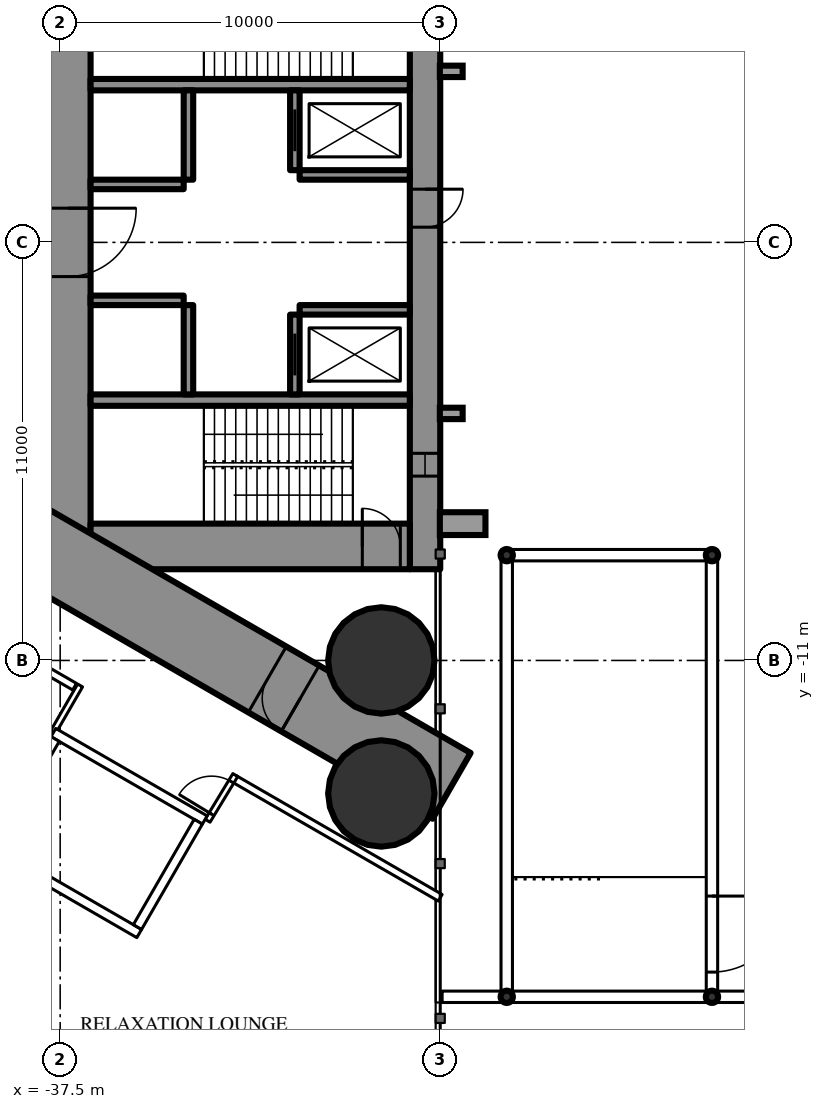
"""IFC4 building model, lengths in metres.
Left out: names, types, materials, properties, quantities, classifications, styles, units other than length and angle.
Written with IfcOpenShell. Run it as: python <this file> out.ifc"""

import sys

from ifc_helpers import new_model, si_unit, direction, frame, frame_2d, origin, origin_2d, place, context, subcontext, project, spatial, rectangle, hollow_circle, extrude, element, fill, save


model = new_model("IFC4")
c1 = context("Model", 3, precision=1e-05, world=origin(), true_north=direction((0.0, 1.0)))
c2 = subcontext(c1, "Body", "Model", "MODEL_VIEW")
j1 = project(units=[si_unit("LENGTHUNIT", "METRE"), si_unit("PLANEANGLEUNIT", "RADIAN")], contexts=[c1])
p1 = place(None, origin())
s1 = spatial("IfcSite", under=j1, at=p1, CompositionType="ELEMENT")
p2 = place(p1, origin())
s2 = spatial("IfcBuilding", under=s1, at=p2, CompositionType="ELEMENT")
p3 = place(p2, frame((0.0, 0.0, 12.6)))
s3 = spatial("IfcBuildingStorey", under=s2, at=p3, CompositionType="ELEMENT", Elevation=12.6)
for number, where, z_axis, x_axis in (
    (1, (-29.05, -11.0, 0.0), (0.0, 0.0, 1.0), (1.0, 0.0, 0.0)),
    (2, (-29.05, -14.5, 0.0), (0.0, 0.0, 1.0), (1.0, 0.0, 0.0)),
):
    element("IfcColumn", number, at=place(p3, frame(where, z_axis=z_axis, x_axis=x_axis)), inside=s3, PredefinedType="COLUMN", context=c2, shape_type="SweptSolid", body=[
        extrude(hollow_circle(Radius=1.4, WallThickness=0.12, at=origin_2d()), origin(), (0.0, 0.0, 1.0), 5.4),
    ])
p4 = place(p3, frame((-27.9, 8.6, 0.0), z_axis=(0.0, 0.0, 1.0), x_axis=(0.0, -1.0, 0.0)))
e3 = element("IfcWall", 3, at=p4, inside=s3, PredefinedType="SHEAR", context=c2, shape_type="SweptSolid", body=[
    extrude(rectangle(XDim=17.2, YDim=0.8, at=frame_2d((8.6, 0.0))), origin(), (0.0, 0.0, 1.0), 5.4),
])
p5 = place(p4, frame((7.2, 0.0, 0.0)))
e4 = element("IfcOpeningElement", 4, at=p5, cuts=e3, PredefinedType="OPENING", context=c2, shape_type="SweptSolid", body=[
    extrude(rectangle(XDim=1.0, YDim=2.2, at=frame_2d((0.5, 1.1))), frame((0.0, 0.41, 0.0), z_axis=(0.0, -1.0, 0.0), x_axis=(1.0, 0.0, 0.0)), (0.0, 0.0, 1.0), 0.82),
])
p6 = place(p4, frame((2.45, 0.0, 0.6)))
e5 = element("IfcOpeningElement", 5, at=p6, cuts=e3, PredefinedType="OPENING", context=c2, shape_type="SweptSolid", body=[
    extrude(rectangle(XDim=0.6, YDim=3.9, at=frame_2d((0.3, 1.95))), frame((0.0, 0.41, 0.0), z_axis=(0.0, -1.0, 0.0), x_axis=(1.0, 0.0, 0.0)), (0.0, 0.0, 1.0), 0.82),
])
p7 = place(p4, frame((14.15, 0.0, 0.6)))
e6 = element("IfcOpeningElement", 6, at=p7, cuts=e3, PredefinedType="OPENING", context=c2, shape_type="SweptSolid", body=[
    extrude(rectangle(XDim=0.6, YDim=3.9, at=frame_2d((0.3, 1.95))), frame((0.0, 0.41, 0.0), z_axis=(0.0, -1.0, 0.0), x_axis=(1.0, 0.0, 0.0)), (0.0, 0.0, 1.0), 0.82),
])
p8 = place(p3, frame((-37.3, 8.6, 0.0), z_axis=(0.0, 0.0, 1.0), x_axis=(0.0, -1.0, 0.0)))
e7 = element("IfcWall", 7, at=p8, inside=s3, PredefinedType="SHEAR", context=c2, shape_type="SweptSolid", body=[
    extrude(rectangle(XDim=17.2, YDim=1.2, at=frame_2d((8.6, 0.0))), origin(), (0.0, 0.0, 1.0), 5.4),
])
p9 = place(p8, frame((7.7, 0.0, 0.0)))
e8 = element("IfcOpeningElement", 8, at=p9, cuts=e7, PredefinedType="OPENING", context=c2, shape_type="SweptSolid", body=[
    extrude(rectangle(XDim=1.8, YDim=2.2, at=frame_2d((0.9, 1.1))), frame((0.0, 0.61, 0.0), z_axis=(0.0, -1.0, 0.0), x_axis=(1.0, 0.0, 0.0)), (0.0, 0.0, 1.0), 1.22),
])
p10 = place(p3, frame((-28.3, -8.0, 0.0), z_axis=(0.0, 0.0, 1.0), x_axis=(-1.0, 0.0, 0.0)))
e9 = element("IfcWall", 9, at=p10, inside=s3, PredefinedType="SHEAR", context=c2, shape_type="SweptSolid", body=[
    extrude(rectangle(XDim=8.4, YDim=1.2, at=frame_2d((4.2, 0.0))), origin(), (0.0, 0.0, 1.0), 5.4),
])
p11 = place(p10, frame((0.25, 0.0, 0.0)))
e10 = element("IfcOpeningElement", 10, at=p11, cuts=e9, PredefinedType="OPENING", context=c2, shape_type="SweptSolid", body=[
    extrude(rectangle(XDim=1.0, YDim=2.2, at=frame_2d((0.5, 1.1))), frame((0.0, 0.61, 0.0), z_axis=(0.0, -1.0, 0.0), x_axis=(1.0, 0.0, 0.0)), (0.0, 0.0, 1.0), 1.22),
])
for number, where, z_axis, x_axis in (
    (11, (-28.3, 4.15, 0.0), (0.0, 0.0, 1.0), (-1.0, 0.0, 0.0)),
    (12, (-28.3, -4.15, 0.0), (0.0, 0.0, 1.0), (-1.0, 0.0, 0.0)),
):
    element("IfcWall", number, at=place(p3, frame(where, z_axis=z_axis, x_axis=x_axis)), inside=s3, PredefinedType="SHEAR", context=c2, shape_type="SweptSolid", body=[
        extrude(rectangle(XDim=8.4, YDim=0.3, at=frame_2d((4.2, 0.0))), origin(), (0.0, 0.0, 1.0), 5.4),
    ])
p12 = place(p3, frame((-31.325, 4.0, 0.0), z_axis=(0.0, 0.0, 1.0), x_axis=(0.0, -1.0, 0.0)))
e13 = element("IfcWall", 13, at=p12, inside=s3, PredefinedType="SHEAR", context=c2, shape_type="SweptSolid", body=[
    extrude(rectangle(XDim=2.1, YDim=0.25, at=frame_2d((1.05, 0.0))), origin(), (0.0, 0.0, 1.0), 5.4),
])
p13 = place(p12, frame((0.5, 0.0, 0.0)))
e14 = element("IfcOpeningElement", 14, at=p13, cuts=e13, PredefinedType="OPENING", context=c2, shape_type="SweptSolid", body=[
    extrude(rectangle(XDim=1.1, YDim=2.2, at=frame_2d((0.55, 1.1))), frame((0.0, 0.135, 0.0), z_axis=(0.0, -1.0, 0.0), x_axis=(1.0, 0.0, 0.0)), (0.0, 0.0, 1.0), 0.27),
])
p14 = place(p3, frame((-34.125, 4.0, 0.0), z_axis=(0.0, 0.0, 1.0), x_axis=(0.0, -1.0, 0.0)))
e15 = element("IfcWall", 15, at=p14, inside=s3, PredefinedType="SHEAR", context=c2, shape_type="SweptSolid", body=[
    extrude(rectangle(XDim=2.35, YDim=0.25, at=frame_2d((1.175, 0.0))), origin(), (0.0, 0.0, 1.0), 5.4),
])
p15 = place(p3, frame((-28.3, 1.775, 0.0), z_axis=(0.0, 0.0, 1.0), x_axis=(-1.0, 0.0, 0.0)))
e16 = element("IfcWall", 16, at=p15, inside=s3, PredefinedType="SHEAR", context=c2, shape_type="SweptSolid", body=[
    extrude(rectangle(XDim=2.9, YDim=0.25, at=frame_2d((1.45, 0.0))), origin(), (0.0, 0.0, 1.0), 5.4),
])
p16 = place(p3, frame((-34.25, 1.525, 0.0), z_axis=(0.0, 0.0, 1.0), x_axis=(-1.0, 0.0, 0.0)))
e17 = element("IfcWall", 17, at=p16, inside=s3, PredefinedType="SHEAR", context=c2, shape_type="SweptSolid", body=[
    extrude(rectangle(XDim=2.45, YDim=0.25, at=frame_2d((1.225, 0.0))), origin(), (0.0, 0.0, 1.0), 5.4),
])
p17 = place(p3, frame((-31.325, -1.9, 0.0), z_axis=(0.0, 0.0, 1.0), x_axis=(0.0, -1.0, 0.0)))
e18 = element("IfcWall", 18, at=p17, inside=s3, PredefinedType="SHEAR", context=c2, shape_type="SweptSolid", body=[
    extrude(rectangle(XDim=2.1, YDim=0.25, at=frame_2d((1.05, 0.0))), origin(), (0.0, 0.0, 1.0), 5.4),
])
p18 = place(p17, frame((0.5, 0.0, 0.0)))
e19 = element("IfcOpeningElement", 19, at=p18, cuts=e18, PredefinedType="OPENING", context=c2, shape_type="SweptSolid", body=[
    extrude(rectangle(XDim=1.1, YDim=2.2, at=frame_2d((0.55, 1.1))), frame((0.0, 0.135, 0.0), z_axis=(0.0, -1.0, 0.0), x_axis=(1.0, 0.0, 0.0)), (0.0, 0.0, 1.0), 0.27),
])
p19 = place(p3, frame((-34.125, -1.65, 0.0), z_axis=(0.0, 0.0, 1.0), x_axis=(0.0, -1.0, 0.0)))
e20 = element("IfcWall", 20, at=p19, inside=s3, PredefinedType="SHEAR", context=c2, shape_type="SweptSolid", body=[
    extrude(rectangle(XDim=2.35, YDim=0.25, at=frame_2d((1.175, 0.0))), origin(), (0.0, 0.0, 1.0), 5.4),
])
p20 = place(p3, frame((-28.3, -1.775, 0.0), z_axis=(0.0, 0.0, 1.0), x_axis=(-1.0, 0.0, 0.0)))
e21 = element("IfcWall", 21, at=p20, inside=s3, PredefinedType="SHEAR", context=c2, shape_type="SweptSolid", body=[
    extrude(rectangle(XDim=2.9, YDim=0.25, at=frame_2d((1.45, 0.0))), origin(), (0.0, 0.0, 1.0), 5.4),
])
p21 = place(p3, frame((-34.25, -1.525, 0.0), z_axis=(0.0, 0.0, 1.0), x_axis=(-1.0, 0.0, 0.0)))
e22 = element("IfcWall", 22, at=p21, inside=s3, PredefinedType="SHEAR", context=c2, shape_type="SweptSolid", body=[
    extrude(rectangle(XDim=2.45, YDim=0.25, at=frame_2d((1.225, 0.0))), origin(), (0.0, 0.0, 1.0), 5.4),
])
p22 = place(p3, frame((-27.2, 14.3, 0.0), z_axis=(0.0, 0.0, 1.0), x_axis=(-0.866026593062, -0.499997940104, 0.0)))
e23 = element("IfcWall", 23, at=p22, inside=s3, PredefinedType="SHEAR", context=c2, shape_type="SweptSolid", body=[
    extrude(rectangle(XDim=28.946, YDim=2.0, at=frame_2d((14.473, 0.0))), origin(), (0.0, 0.0, 1.0), 5.4),
])
p23 = place(p22, frame((4.6, 0.0, 0.0)))
e24 = element("IfcOpeningElement", 24, at=p23, cuts=e23, PredefinedType="OPENING", context=c2, shape_type="SweptSolid", body=[
    extrude(rectangle(XDim=1.0, YDim=2.2, at=frame_2d((0.5, 1.1))), frame((0.0, 1.01, 0.0), z_axis=(0.0, -1.0, 0.0), x_axis=(1.0, 0.0, 0.0)), (0.0, 0.0, 1.0), 2.02),
])
p24 = place(p22, frame((13.395, 0.0, 0.0)))
e25 = element("IfcOpeningElement", 25, at=p24, cuts=e23, PredefinedType="OPENING", context=c2, shape_type="SweptSolid", body=[
    extrude(rectangle(XDim=1.8, YDim=2.2, at=frame_2d((0.9, 1.1))), frame((0.0, 1.01, 0.0), z_axis=(0.0, -1.0, 0.0), x_axis=(1.0, 0.0, 0.0)), (0.0, 0.0, 1.0), 2.02),
])
p25 = place(p3, frame((-27.2, -14.3, 0.0), z_axis=(0.0, 0.0, 1.0), x_axis=(-0.866024044937, 0.500002353585, 0.0)))
e26 = element("IfcWall", 26, at=p25, inside=s3, PredefinedType="SHEAR", context=c2, shape_type="SweptSolid", body=[
    extrude(rectangle(XDim=27.533, YDim=2.0, at=frame_2d((13.767, 0.0))), origin(), (0.0, 0.0, 1.0), 5.4),
])
p26 = place(p25, frame((4.6, 0.0, 0.0)))
e27 = element("IfcOpeningElement", 27, at=p26, cuts=e26, PredefinedType="OPENING", context=c2, shape_type="SweptSolid", body=[
    extrude(rectangle(XDim=1.0, YDim=2.2, at=frame_2d((0.5, 1.1))), frame((0.0, 1.01, 0.0), z_axis=(0.0, -1.0, 0.0), x_axis=(1.0, 0.0, 0.0)), (0.0, 0.0, 1.0), 2.02),
])
p27 = place(p25, frame((13.395, 0.0, 0.0)))
e28 = element("IfcOpeningElement", 28, at=p27, cuts=e26, PredefinedType="OPENING", context=c2, shape_type="SweptSolid", body=[
    extrude(rectangle(XDim=1.8, YDim=2.2, at=frame_2d((0.9, 1.1))), frame((0.0, 1.01, 0.0), z_axis=(0.0, -1.0, 0.0), x_axis=(1.0, 0.0, 0.0)), (0.0, 0.0, 1.0), 2.02),
])
p28 = place(p3, frame((-27.45, -19.85, 0.0), z_axis=(0.0, 0.0, 1.0), x_axis=(1.0, 0.0, 0.0)))
e29 = element("IfcWall", 29, at=p28, inside=s3, PredefinedType="PARAPET", context=c2, shape_type="SweptSolid", body=[
    extrude(rectangle(XDim=1.55, YDim=0.3, at=frame_2d((0.775, 0.0))), origin(), (0.0, 0.0, 1.0), 1.1),
])
p29 = place(p3, frame((-20.2, -19.85, 0.0), z_axis=(0.0, 0.0, 1.0), x_axis=(1.0, 0.0, 0.0)))
e30 = element("IfcWall", 30, at=p29, inside=s3, PredefinedType="PARAPET", context=c2, shape_type="SweptSolid", body=[
    extrude(rectangle(XDim=40.4, YDim=0.3, at=frame_2d((20.2, 0.0))), origin(), (0.0, 0.0, 1.0), 1.1),
])
p30 = place(p3, frame((-27.5, -17.244, 0.0), z_axis=(0.0, 0.0, 1.0), x_axis=(-0.866027347857, 0.499996632752, 0.0)))
e31 = element("IfcWall", 31, at=p30, inside=s3, PredefinedType="PARTITIONING", context=c2, shape_type="SweptSolid", body=[
    extrude(rectangle(XDim=6.269, YDim=0.2, at=frame_2d((3.135, 0.0))), origin(), (0.0, 0.0, 1.0), 4.25),
])
p31 = place(p3, frame((-37.12, -11.69, 0.0), z_axis=(0.0, 0.0, 1.0), x_axis=(-0.866028803602, 0.499994111297, 0.0)))
e32 = element("IfcWall", 32, at=p31, inside=s3, PredefinedType="PARTITIONING", context=c2, shape_type="SweptSolid", body=[
    extrude(rectangle(XDim=23.26, YDim=0.2, at=frame_2d((11.63, 0.0))), origin(), (0.0, 0.0, 1.0), 4.25),
])
p32 = place(p31, frame((20.909, 0.0, 0.0)))
e33 = element("IfcOpeningElement", 33, at=p32, cuts=e32, PredefinedType="OPENING", context=c2, shape_type="SweptSolid", body=[
    extrude(rectangle(XDim=1.8, YDim=2.2, at=frame_2d((0.9, 1.1))), frame((0.0, 0.11, 0.0), z_axis=(0.0, -1.0, 0.0), x_axis=(1.0, 0.0, 0.0)), (0.0, 0.0, 1.0), 0.22),
])
p33 = place(p31, frame((15.544, 0.0, 0.0)))
e34 = element("IfcOpeningElement", 34, at=p33, cuts=e32, PredefinedType="OPENING", context=c2, shape_type="SweptSolid", body=[
    extrude(rectangle(XDim=1.8, YDim=2.2, at=frame_2d((0.9, 1.1))), frame((0.0, 0.11, 0.0), z_axis=(0.0, -1.0, 0.0), x_axis=(1.0, 0.0, 0.0)), (0.0, 0.0, 1.0), 0.22),
])
p34 = place(p31, frame((5.365, 0.0, 0.0)))
e35 = element("IfcOpeningElement", 35, at=p34, cuts=e32, PredefinedType="OPENING", context=c2, shape_type="SweptSolid", body=[
    extrude(rectangle(XDim=1.8, YDim=2.2, at=frame_2d((0.9, 1.1))), frame((0.0, 0.11, 0.0), z_axis=(0.0, -1.0, 0.0), x_axis=(1.0, 0.0, 0.0)), (0.0, 0.0, 1.0), 0.22),
])
p35 = place(p3, frame((-36.976, -11.658, 0.0), z_axis=(0.0, 0.0, 1.0), x_axis=(-0.50008355685, -0.86597715684, 0.0)))
e36 = element("IfcWall", 36, at=p35, inside=s3, PredefinedType="PARTITIONING", context=c2, shape_type="SweptSolid", body=[
    extrude(rectangle(XDim=1.405, YDim=0.15, at=frame_2d((0.702, 0.0))), origin(), (0.0, 0.0, 1.0), 5.15),
])
p36 = place(p3, frame((-33.621, -15.218, 0.0), z_axis=(0.0, 0.0, 1.0), x_axis=(0.518424923641, 0.855123148177, 0.0)))
e37 = element("IfcWall", 37, at=p36, inside=s3, PredefinedType="PARTITIONING", context=c2, shape_type="SweptSolid", body=[
    extrude(rectangle(XDim=1.405, YDim=0.15, at=frame_2d((0.703, 0.0))), origin(), (0.0, 0.0, 1.0), 5.15),
])
p37 = place(p36, frame((0.203, 0.0, 0.0)))
e38 = element("IfcOpeningElement", 38, at=p37, cuts=e37, PredefinedType="OPENING", context=c2, shape_type="SweptSolid", body=[
    extrude(rectangle(XDim=1.0, YDim=2.2, at=frame_2d((0.5, 1.1))), frame((0.0, 0.085, 0.0), z_axis=(0.0, -1.0, 0.0), x_axis=(1.0, 0.0, 0.0)), (0.0, 0.0, 1.0), 0.17),
])
p38 = place(p3, frame((-33.696, -15.197, 0.0), z_axis=(0.0, 0.0, 1.0), x_axis=(-0.865976953817, 0.500083908417, 0.0)))
e39 = element("IfcWall", 39, at=p38, inside=s3, PredefinedType="PARTITIONING", context=c2, shape_type="SweptSolid", body=[
    extrude(rectangle(XDim=4.599, YDim=0.25, at=frame_2d((2.3, 0.0))), origin(), (0.0, 0.0, 1.0), 5.15),
])
p39 = place(p3, frame((-35.42, -18.186, 0.0), z_axis=(0.0, 0.0, 1.0), x_axis=(-0.865990227814, 0.50006092162, 0.0)))
e40 = element("IfcWall", 40, at=p39, inside=s3, PredefinedType="PARTITIONING", context=c2, shape_type="SweptSolid", body=[
    extrude(rectangle(XDim=4.6, YDim=0.25, at=frame_2d((2.3, 0.0))), origin(), (0.0, 0.0, 1.0), 5.15),
])
p40 = place(p3, frame((-33.866, -15.243, 0.0), z_axis=(0.0, 0.0, 1.0), x_axis=(-0.499929347863, -0.866066190972, 0.0)))
e41 = element("IfcWall", 41, at=p40, inside=s3, PredefinedType="PARTITIONING", context=c2, shape_type="SweptSolid", body=[
    extrude(rectangle(XDim=3.201, YDim=0.25, at=frame_2d((1.6, 0.0))), origin(), (0.0, 0.0, 1.0), 5.15),
])
p41 = place(p3, frame((-37.633, -13.068, 0.0), z_axis=(0.0, 0.0, 1.0), x_axis=(-0.499872130319, -0.866099216793, 0.0)))
e42 = element("IfcWall", 42, at=p41, inside=s3, PredefinedType="PARTITIONING", context=c2, shape_type="SweptSolid", body=[
    extrude(rectangle(XDim=3.2, YDim=0.25, at=frame_2d((1.6, 0.0))), origin(), (0.0, 0.0, 1.0), 5.15),
])
for number, where, z_axis, x_axis in (
    (43, (-25.75, -8.23, 0.0), (0.0, 0.0, 1.0), (1.0, 0.0, 0.0)),
    (44, (-20.35, -8.23, 0.0), (0.0, 0.0, 1.0), (1.0, 0.0, 0.0)),
    (45, (-25.75, -19.85, 0.0), (0.0, 0.0, 1.0), (1.0, 0.0, 0.0)),
    (46, (-20.35, -19.85, 0.0), (0.0, 0.0, 1.0), (1.0, 0.0, 0.0)),
):
    element("IfcColumn", number, at=place(p3, frame(where, z_axis=z_axis, x_axis=x_axis)), inside=s3, PredefinedType="COLUMN", context=c2, shape_type="SweptSolid", body=[
        extrude(hollow_circle(Radius=0.162, WallThickness=0.012, at=origin_2d()), origin(), (0.0, 0.0, 1.0), 3.0),
    ])
for number, where, z_axis, x_axis in (
    (47, (-25.689, -19.85, 0.0), (0.0, 0.0, 1.0), (1.0, 0.0, 0.0)),
    (48, (-25.689, -8.23, 0.0), (0.0, 0.0, 1.0), (1.0, 0.0, 0.0)),
):
    element("IfcWall", number, at=place(p3, frame(where, z_axis=z_axis, x_axis=x_axis)), inside=s3, PredefinedType="SOLIDWALL", context=c2, shape_type="SweptSolid", body=[
        extrude(rectangle(XDim=5.278, YDim=0.3, at=frame_2d((2.639, 0.0))), origin(), (0.0, 0.0, 1.0), 2.23),
    ])
p42 = place(p3, frame((-20.35, -8.291, 0.0), z_axis=(0.0, 0.0, 1.0), x_axis=(0.0, -1.0, 0.0)))
e49 = element("IfcWall", 49, at=p42, inside=s3, PredefinedType="SOLIDWALL", context=c2, shape_type="SweptSolid", body=[
    extrude(rectangle(XDim=11.498, YDim=0.3, at=frame_2d((5.749, 0.0))), origin(), (0.0, 0.0, 1.0), 2.23),
])
p43 = place(p42, frame((8.909, 0.0, 0.0)))
e50 = element("IfcOpeningElement", 50, at=p43, cuts=e49, PredefinedType="OPENING", context=c2, shape_type="SweptSolid", body=[
    extrude(rectangle(XDim=2.0, YDim=2.2, at=frame_2d((1.0, 1.1))), frame((0.0, 0.16, 0.0), z_axis=(0.0, -1.0, 0.0), x_axis=(1.0, 0.0, 0.0)), (0.0, 0.0, 1.0), 0.32),
])
p44 = place(p3, frame((-25.75, -8.291, 0.0), z_axis=(0.0, 0.0, 1.0), x_axis=(0.0, -1.0, 0.0)))
e51 = element("IfcWall", 51, at=p44, inside=s3, PredefinedType="SOLIDWALL", context=c2, shape_type="SweptSolid", body=[
    extrude(rectangle(XDim=11.498, YDim=0.3, at=frame_2d((5.749, 0.0))), origin(), (0.0, 0.0, 1.0), 2.23),
])
p45 = place(p37, origin())
e52 = element("IfcDoor", 52, at=p45, inside=s3, OperationType="SINGLE_SWING_LEFT", PredefinedType="DOOR", context=c2, shape_type="SweptSolid", body=[
    extrude(rectangle(XDim=1.0, YDim=2.2, at=frame_2d((0.5, 1.1))), frame((0.0, 0.025, 0.0), z_axis=(0.0, -1.0, 0.0), x_axis=(1.0, 0.0, 0.0)), (0.0, 0.0, 1.0), 0.05),
])
fill(e38, e52)
p46 = place(p26, origin())
e53 = element("IfcDoor", 53, at=p46, inside=s3, OperationType="SINGLE_SWING_LEFT", PredefinedType="DOOR", context=c2, shape_type="SweptSolid", body=[
    extrude(rectangle(XDim=1.0, YDim=2.2, at=frame_2d((0.5, 1.1))), frame((0.0, 0.025, 0.0), z_axis=(0.0, -1.0, 0.0), x_axis=(1.0, 0.0, 0.0)), (0.0, 0.0, 1.0), 0.05),
])
fill(e27, e53)
p47 = place(p9, origin())
e54 = element("IfcDoor", 54, at=p47, inside=s3, OperationType="DOUBLE_DOOR_SINGLE_SWING", PredefinedType="DOOR", context=c2, shape_type="SweptSolid", body=[
    extrude(rectangle(XDim=1.8, YDim=2.2, at=frame_2d((0.9, 1.1))), frame((0.0, 0.025, 0.0), z_axis=(0.0, -1.0, 0.0), x_axis=(1.0, 0.0, 0.0)), (0.0, 0.0, 1.0), 0.05),
])
fill(e8, e54)
p48 = place(p11, origin())
e55 = element("IfcDoor", 55, at=p48, inside=s3, OperationType="SINGLE_SWING_RIGHT", PredefinedType="DOOR", context=c2, shape_type="SweptSolid", body=[
    extrude(rectangle(XDim=1.0, YDim=2.2, at=frame_2d((0.5, 1.1))), frame((0.0, 0.025, 0.0), z_axis=(0.0, -1.0, 0.0), x_axis=(1.0, 0.0, 0.0)), (0.0, 0.0, 1.0), 0.05),
])
fill(e10, e55)
p49 = place(p5, origin())
e56 = element("IfcDoor", 56, at=p49, inside=s3, OperationType="SINGLE_SWING_LEFT", PredefinedType="DOOR", context=c2, shape_type="SweptSolid", body=[
    extrude(rectangle(XDim=1.0, YDim=2.2, at=frame_2d((0.5, 1.1))), frame((0.0, 0.025, 0.0), z_axis=(0.0, -1.0, 0.0), x_axis=(1.0, 0.0, 0.0)), (0.0, 0.0, 1.0), 0.05),
])
fill(e4, e56)
p50 = place(p13, origin())
e57 = element("IfcDoor", 57, at=p50, inside=s3, OperationType="SLIDING_TO_LEFT", PredefinedType="USERDEFINED", context=c2, shape_type="SweptSolid", body=[
    extrude(rectangle(XDim=1.1, YDim=2.2, at=frame_2d((0.55, 1.1))), frame((0.0, 0.025, 0.0), z_axis=(0.0, -1.0, 0.0), x_axis=(1.0, 0.0, 0.0)), (0.0, 0.0, 1.0), 0.05),
])
fill(e14, e57)
p51 = place(p18, origin())
e58 = element("IfcDoor", 58, at=p51, inside=s3, OperationType="SLIDING_TO_LEFT", PredefinedType="USERDEFINED", context=c2, shape_type="SweptSolid", body=[
    extrude(rectangle(XDim=1.1, YDim=2.2, at=frame_2d((0.55, 1.1))), frame((0.0, 0.025, 0.0), z_axis=(0.0, -1.0, 0.0), x_axis=(1.0, 0.0, 0.0)), (0.0, 0.0, 1.0), 0.05),
])
fill(e19, e58)
p52 = place(p43, origin())
e59 = element("IfcDoor", 59, at=p52, inside=s3, OperationType="DOUBLE_DOOR_SINGLE_SWING", PredefinedType="DOOR", context=c2, shape_type="SweptSolid", body=[
    extrude(rectangle(XDim=2.0, YDim=2.2, at=frame_2d((1.0, 1.1))), frame((0.0, 0.025, 0.0), z_axis=(0.0, -1.0, 0.0), x_axis=(1.0, 0.0, 0.0)), (0.0, 0.0, 1.0), 0.05),
])
fill(e50, e59)
p53 = place(p7, origin())
e60 = element("IfcWindow", 60, at=p53, inside=s3, PartitioningType="SINGLE_PANEL", PredefinedType="WINDOW", context=c2, shape_type="SweptSolid", body=[
    extrude(rectangle(XDim=0.6, YDim=3.9, at=frame_2d((0.3, 1.95))), frame((0.0, 0.03, 0.0), z_axis=(0.0, -1.0, 0.0), x_axis=(1.0, 0.0, 0.0)), (0.0, 0.0, 1.0), 0.06),
])
fill(e6, e60)
save(model, sys.argv[1])
